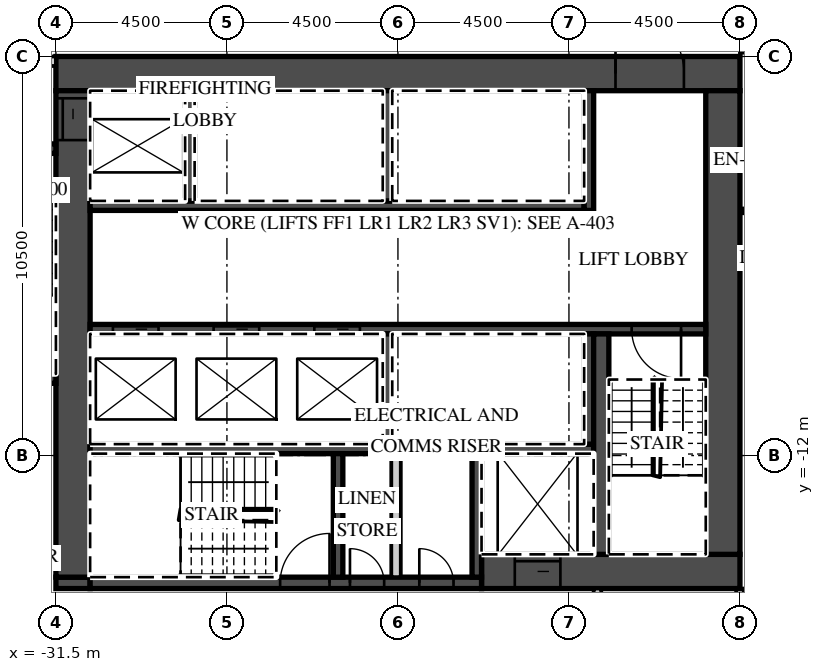
"""IFC4 building model, lengths in metres.
Left out: names, types, materials, properties, quantities, classifications, styles, units other than length and angle.
Written with IfcOpenShell. Run it as: python <this file> out.ifc"""

import sys

from ifc_helpers import new_model, si_unit, direction, frame, frame_2d, origin, place, context, subcontext, project, spatial, rectangle, extrude, element, fill, save


model = new_model("IFC4")
c1 = context("Model", 3, precision=1e-05, world=origin(), true_north=direction((0.0, 1.0)))
c2 = subcontext(c1, "Body", "Model", "MODEL_VIEW")
j1 = project(units=[si_unit("LENGTHUNIT", "METRE"), si_unit("PLANEANGLEUNIT", "RADIAN")], contexts=[c1])
p1 = place(None, origin())
s1 = spatial("IfcSite", under=j1, at=p1, CompositionType="ELEMENT")
p2 = place(p1, origin())
s2 = spatial("IfcBuilding", under=s1, at=p2, CompositionType="ELEMENT")
p3 = place(p2, frame((0.0, 0.0, 120.7)))
s3 = spatial("IfcBuildingStorey", under=s2, at=p3, CompositionType="ELEMENT", Elevation=120.7)
p4 = place(p3, frame((-13.5, -22.232, 0.0), z_axis=(0.0, 0.0, 1.0), x_axis=(0.0, 1.0, 0.0)))
e1 = element("IfcWall", 1, at=p4, inside=s3, PredefinedType="PARTITIONING", context=c2, shape_type="SweptSolid", body=[
    extrude(rectangle(XDim=6.732, YDim=0.2, at=frame_2d((3.366, 0.0))), origin(), (0.0, 0.0, 1.0), 3.02),
])
p5 = place(p3, frame((-13.5, -1.3, 0.0), z_axis=(0.0, 0.0, 1.0), x_axis=(1.0, 0.0, 0.0)))
e2 = element("IfcWall", 2, at=p5, inside=s3, PredefinedType="PARTITIONING", context=c2, shape_type="SweptSolid", body=[
    extrude(rectangle(XDim=60.932, YDim=0.2, at=frame_2d((30.466, 0.0))), origin(), (0.0, 0.0, 1.0), 3.02),
])
p6 = place(p5, frame((2.925, 0.0, 0.0)))
e3 = element("IfcOpeningElement", 3, at=p6, cuts=e2, PredefinedType="OPENING", context=c2, shape_type="SweptSolid", body=[
    extrude(rectangle(XDim=1.0, YDim=2.1, at=frame_2d((0.5, 1.05))), frame((0.0, 0.11, 0.0), z_axis=(0.0, -1.0, 0.0), x_axis=(1.0, 0.0, 0.0)), (0.0, 0.0, 1.0), 0.22),
])
p7 = place(p5, frame((9.863, 0.0, 0.0)))
e4 = element("IfcOpeningElement", 4, at=p7, cuts=e2, PredefinedType="OPENING", context=c2, shape_type="SweptSolid", body=[
    extrude(rectangle(XDim=1.2, YDim=2.1, at=frame_2d((0.6, 1.05))), frame((0.0, 0.11, 0.0), z_axis=(0.0, -1.0, 0.0), x_axis=(1.0, 0.0, 0.0)), (0.0, 0.0, 1.0), 0.22),
])
p8 = place(p5, frame((15.938, 0.0, 0.0)))
e5 = element("IfcOpeningElement", 5, at=p8, cuts=e2, PredefinedType="OPENING", context=c2, shape_type="SweptSolid", body=[
    extrude(rectangle(XDim=1.2, YDim=2.1, at=frame_2d((0.6, 1.05))), frame((0.0, 0.11, 0.0), z_axis=(0.0, -1.0, 0.0), x_axis=(1.0, 0.0, 0.0)), (0.0, 0.0, 1.0), 0.22),
])
p9 = place(p5, frame((27.862, 0.0, 0.0)))
e6 = element("IfcOpeningElement", 6, at=p9, cuts=e2, PredefinedType="OPENING", context=c2, shape_type="SweptSolid", body=[
    extrude(rectangle(XDim=1.2, YDim=2.1, at=frame_2d((0.6, 1.05))), frame((0.0, 0.11, 0.0), z_axis=(0.0, -1.0, 0.0), x_axis=(1.0, 0.0, 0.0)), (0.0, 0.0, 1.0), 0.22),
])
p10 = place(p5, frame((34.45, 0.0, 0.0)))
e7 = element("IfcOpeningElement", 7, at=p10, cuts=e2, PredefinedType="OPENING", context=c2, shape_type="SweptSolid", body=[
    extrude(rectangle(XDim=1.0, YDim=2.1, at=frame_2d((0.5, 1.05))), frame((0.0, 0.11, 0.0), z_axis=(0.0, -1.0, 0.0), x_axis=(1.0, 0.0, 0.0)), (0.0, 0.0, 1.0), 0.22),
])
p11 = place(p5, frame((36.55, 0.0, 0.0)))
e8 = element("IfcOpeningElement", 8, at=p11, cuts=e2, PredefinedType="OPENING", context=c2, shape_type="SweptSolid", body=[
    extrude(rectangle(XDim=1.0, YDim=2.1, at=frame_2d((0.5, 1.05))), frame((0.0, 0.11, 0.0), z_axis=(0.0, -1.0, 0.0), x_axis=(1.0, 0.0, 0.0)), (0.0, 0.0, 1.0), 0.22),
])
p12 = place(p5, frame((41.075, 0.0, 0.0)))
e9 = element("IfcOpeningElement", 9, at=p12, cuts=e2, PredefinedType="OPENING", context=c2, shape_type="SweptSolid", body=[
    extrude(rectangle(XDim=1.0, YDim=2.1, at=frame_2d((0.5, 1.05))), frame((0.0, 0.11, 0.0), z_axis=(0.0, -1.0, 0.0), x_axis=(1.0, 0.0, 0.0)), (0.0, 0.0, 1.0), 0.22),
])
p13 = place(p5, frame((45.55, 0.0, 0.0)))
e10 = element("IfcOpeningElement", 10, at=p13, cuts=e2, PredefinedType="OPENING", context=c2, shape_type="SweptSolid", body=[
    extrude(rectangle(XDim=1.0, YDim=2.1, at=frame_2d((0.5, 1.05))), frame((0.0, 0.11, 0.0), z_axis=(0.0, -1.0, 0.0), x_axis=(1.0, 0.0, 0.0)), (0.0, 0.0, 1.0), 0.22),
])
p14 = place(p5, frame((50.075, 0.0, 0.0)))
e11 = element("IfcOpeningElement", 11, at=p14, cuts=e2, PredefinedType="OPENING", context=c2, shape_type="SweptSolid", body=[
    extrude(rectangle(XDim=1.0, YDim=2.1, at=frame_2d((0.5, 1.05))), frame((0.0, 0.11, 0.0), z_axis=(0.0, -1.0, 0.0), x_axis=(1.0, 0.0, 0.0)), (0.0, 0.0, 1.0), 0.22),
])
p15 = place(p5, frame((54.575, 0.0, 0.0)))
e12 = element("IfcOpeningElement", 12, at=p15, cuts=e2, PredefinedType="OPENING", context=c2, shape_type="SweptSolid", body=[
    extrude(rectangle(XDim=1.0, YDim=2.1, at=frame_2d((0.5, 1.05))), frame((0.0, 0.11, 0.0), z_axis=(0.0, -1.0, 0.0), x_axis=(1.0, 0.0, 0.0)), (0.0, 0.0, 1.0), 0.22),
])
p16 = place(p5, frame((59.882, 0.0, 0.0)))
e13 = element("IfcOpeningElement", 13, at=p16, cuts=e2, PredefinedType="OPENING", context=c2, shape_type="SweptSolid", body=[
    extrude(rectangle(XDim=0.9, YDim=2.1, at=frame_2d((0.45, 1.05))), frame((0.0, 0.11, 0.0), z_axis=(0.0, -1.0, 0.0), x_axis=(1.0, 0.0, 0.0)), (0.0, 0.0, 1.0), 0.22),
])
p17 = place(p3, frame((-31.5, -1.95, 0.0), z_axis=(0.0, 0.0, 1.0), x_axis=(1.0, 0.0, 0.0)))
e14 = element("IfcWall", 14, at=p17, inside=s3, PredefinedType="SHEAR", context=c2, shape_type="SweptSolid", body=[
    extrude(rectangle(XDim=18.0, YDim=0.9, at=frame_2d((9.0, 0.0))), origin(), (0.0, 0.0, 1.0), 3.02),
])
p18 = place(p17, frame((14.725, 0.0, 0.0)))
e15 = element("IfcOpeningElement", 15, at=p18, cuts=e14, PredefinedType="OPENING", context=c2, shape_type="SweptSolid", body=[
    extrude(rectangle(XDim=1.8, YDim=2.1, at=frame_2d((0.9, 1.05))), frame((0.0, 0.46, 0.0), z_axis=(0.0, -1.0, 0.0), x_axis=(1.0, 0.0, 0.0)), (0.0, 0.0, 1.0), 0.92),
])
p19 = place(p3, frame((-20.3, -15.05, 0.0), z_axis=(0.0, 0.0, 1.0), x_axis=(1.0, 0.0, 0.0)))
e16 = element("IfcWall", 16, at=p19, inside=s3, PredefinedType="SHEAR", context=c2, shape_type="SweptSolid", body=[
    extrude(rectangle(XDim=6.8, YDim=0.9, at=frame_2d((3.4, 0.0))), origin(), (0.0, 0.0, 1.0), 3.02),
])
p20 = place(p19, frame((0.875, 0.0, 0.0)))
e17 = element("IfcOpeningElement", 17, at=p20, cuts=e16, PredefinedType="OPENING", context=c2, shape_type="SweptSolid", body=[
    extrude(rectangle(XDim=1.2, YDim=2.1, at=frame_2d((0.6, 1.05))), frame((0.0, 0.46, 0.0), z_axis=(0.0, -1.0, 0.0), x_axis=(1.0, 0.0, 0.0)), (0.0, 0.0, 1.0), 0.92),
])
p21 = place(p3, frame((-31.5, -15.35, 0.0), z_axis=(0.0, 0.0, 1.0), x_axis=(1.0, 0.0, 0.0)))
e18 = element("IfcWall", 18, at=p21, inside=s3, PredefinedType="SHEAR", context=c2, shape_type="SweptSolid", body=[
    extrude(rectangle(XDim=0.9, YDim=0.3, at=frame_2d((0.45, 0.0))), origin(), (0.0, 0.0, 1.0), 3.02),
])
p22 = place(p3, frame((-30.6, -15.35, 0.0), z_axis=(0.0, 0.0, 1.0), x_axis=(1.0, 0.0, 0.0)))
e19 = element("IfcWall", 19, at=p22, inside=s3, PredefinedType="SHEAR", context=c2, shape_type="SweptSolid", body=[
    extrude(rectangle(XDim=10.3, YDim=0.3, at=frame_2d((5.15, 0.0))), origin(), (0.0, 0.0, 1.0), 3.02),
])
p23 = place(p22, frame((5.0, 0.0, 0.0)))
e20 = element("IfcOpeningElement", 20, at=p23, cuts=e19, PredefinedType="OPENING", context=c2, shape_type="SweptSolid", body=[
    extrude(rectangle(XDim=1.3, YDim=2.1, at=frame_2d((0.65, 1.05))), frame((0.0, 0.16, 0.0), z_axis=(0.0, -1.0, 0.0), x_axis=(1.0, 0.0, 0.0)), (0.0, 0.0, 1.0), 0.32),
])
p24 = place(p22, frame((6.837, 0.0, 0.0)))
e21 = element("IfcOpeningElement", 21, at=p24, cuts=e19, PredefinedType="OPENING", context=c2, shape_type="SweptSolid", body=[
    extrude(rectangle(XDim=0.9, YDim=2.1, at=frame_2d((0.45, 1.05))), frame((0.0, 0.16, 0.0), z_axis=(0.0, -1.0, 0.0), x_axis=(1.0, 0.0, 0.0)), (0.0, 0.0, 1.0), 0.32),
])
p25 = place(p22, frame((8.663, 0.0, 0.0)))
e22 = element("IfcOpeningElement", 22, at=p25, cuts=e19, PredefinedType="OPENING", context=c2, shape_type="SweptSolid", body=[
    extrude(rectangle(XDim=0.9, YDim=2.1, at=frame_2d((0.45, 1.05))), frame((0.0, 0.16, 0.0), z_axis=(0.0, -1.0, 0.0), x_axis=(1.0, 0.0, 0.0)), (0.0, 0.0, 1.0), 0.32),
])
p26 = place(p3, frame((-31.05, -15.2, 0.0), z_axis=(0.0, 0.0, 1.0), x_axis=(0.0, 1.0, 0.0)))
e23 = element("IfcWall", 23, at=p26, inside=s3, PredefinedType="SHEAR", context=c2, shape_type="SweptSolid", body=[
    extrude(rectangle(XDim=12.8, YDim=0.9, at=frame_2d((6.4, 0.0))), origin(), (0.0, 0.0, 1.0), 3.02),
])
p27 = place(p26, frame((11.5, 0.0, 0.0)))
e24 = element("IfcOpeningElement", 24, at=p27, cuts=e23, PredefinedType="OPENING", context=c2, shape_type="SweptSolid", body=[
    extrude(rectangle(XDim=1.1, YDim=2.1, at=frame_2d((0.55, 1.05))), frame((0.0, 0.46, 0.0), z_axis=(0.0, -1.0, 0.0), x_axis=(1.0, 0.0, 0.0)), (0.0, 0.0, 1.0), 0.92),
])
p28 = place(p3, frame((-13.95, -14.6, 0.0), z_axis=(0.0, 0.0, 1.0), x_axis=(0.0, 1.0, 0.0)))
e25 = element("IfcWall", 25, at=p28, inside=s3, PredefinedType="SHEAR", context=c2, shape_type="SweptSolid", body=[
    extrude(rectangle(XDim=12.2, YDim=0.9, at=frame_2d((6.1, 0.0))), origin(), (0.0, 0.0, 1.0), 3.02),
])
p29 = place(p3, frame((-30.6, -5.425, 0.0), z_axis=(0.0, 0.0, 1.0), x_axis=(1.0, 0.0, 0.0)))
e26 = element("IfcWall", 26, at=p29, inside=s3, PredefinedType="SHEAR", context=c2, shape_type="SweptSolid", body=[
    extrude(rectangle(XDim=13.0, YDim=0.25, at=frame_2d((6.5, 0.0))), origin(), (0.0, 0.0, 1.0), 3.02),
])
p30 = place(p3, frame((-17.475, -5.55, 0.0), z_axis=(0.0, 0.0, 1.0), x_axis=(0.0, 1.0, 0.0)))
e27 = element("IfcWall", 27, at=p30, inside=s3, PredefinedType="SHEAR", context=c2, shape_type="SweptSolid", body=[
    extrude(rectangle(XDim=3.15, YDim=0.25, at=frame_2d((1.575, 0.0))), origin(), (0.0, 0.0, 1.0), 3.02),
])
for number, where, z_axis, x_axis in (
    (28, (-27.975, -5.3, 0.0), (0.0, 0.0, 1.0), (0.0, 1.0, 0.0)),
    (29, (-22.775, -5.3, 0.0), (0.0, 0.0, 1.0), (0.0, 1.0, 0.0)),
):
    element("IfcWall", number, at=place(p3, frame(where, z_axis=z_axis, x_axis=x_axis)), inside=s3, PredefinedType="SHEAR", context=c2, shape_type="SweptSolid", body=[
        extrude(rectangle(XDim=2.9, YDim=0.25, at=frame_2d((1.45, 0.0))), origin(), (0.0, 0.0, 1.0), 3.02),
    ])
p31 = place(p3, frame((-30.6, -8.675, 0.0), z_axis=(0.0, 0.0, 1.0), x_axis=(1.0, 0.0, 0.0)))
e30 = element("IfcWall", 30, at=p31, inside=s3, PredefinedType="SHEAR", context=c2, shape_type="SweptSolid", body=[
    extrude(rectangle(XDim=16.2, YDim=0.25, at=frame_2d((8.1, 0.0))), origin(), (0.0, 0.0, 1.0), 3.02),
])
p32 = place(p31, frame((0.6, 0.0, 0.0)))
e31 = element("IfcOpeningElement", 31, at=p32, cuts=e30, PredefinedType="OPENING", context=c2, shape_type="SweptSolid", body=[
    extrude(rectangle(XDim=1.2, YDim=2.1, at=frame_2d((0.6, 1.05))), frame((0.0, 0.135, 0.0), z_axis=(0.0, -1.0, 0.0), x_axis=(1.0, 0.0, 0.0)), (0.0, 0.0, 1.0), 0.27),
])
p33 = place(p31, frame((3.25, 0.0, 0.0)))
e32 = element("IfcOpeningElement", 32, at=p33, cuts=e30, PredefinedType="OPENING", context=c2, shape_type="SweptSolid", body=[
    extrude(rectangle(XDim=1.2, YDim=2.1, at=frame_2d((0.6, 1.05))), frame((0.0, 0.135, 0.0), z_axis=(0.0, -1.0, 0.0), x_axis=(1.0, 0.0, 0.0)), (0.0, 0.0, 1.0), 0.27),
])
p34 = place(p31, frame((5.9, 0.0, 0.0)))
e33 = element("IfcOpeningElement", 33, at=p34, cuts=e30, PredefinedType="OPENING", context=c2, shape_type="SweptSolid", body=[
    extrude(rectangle(XDim=1.2, YDim=2.1, at=frame_2d((0.6, 1.05))), frame((0.0, 0.135, 0.0), z_axis=(0.0, -1.0, 0.0), x_axis=(1.0, 0.0, 0.0)), (0.0, 0.0, 1.0), 0.27),
])
p35 = place(p31, frame((14.25, 0.0, 0.0)))
e34 = element("IfcOpeningElement", 34, at=p35, cuts=e30, PredefinedType="OPENING", context=c2, shape_type="SweptSolid", body=[
    extrude(rectangle(XDim=1.3, YDim=2.1, at=frame_2d((0.65, 1.05))), frame((0.0, 0.135, 0.0), z_axis=(0.0, -1.0, 0.0), x_axis=(1.0, 0.0, 0.0)), (0.0, 0.0, 1.0), 0.27),
])
p36 = place(p3, frame((-30.6, -11.825, 0.0), z_axis=(0.0, 0.0, 1.0), x_axis=(1.0, 0.0, 0.0)))
e35 = element("IfcWall", 35, at=p36, inside=s3, PredefinedType="SHEAR", context=c2, shape_type="SweptSolid", body=[
    extrude(rectangle(XDim=13.25, YDim=0.25, at=frame_2d((6.625, 0.0))), origin(), (0.0, 0.0, 1.0), 3.02),
])
for number, where, z_axis, x_axis in (
    (36, (-17.475, -11.7, 0.0), (0.0, 0.0, 1.0), (0.0, 1.0, 0.0)),
    (37, (-22.775, -11.7, 0.0), (0.0, 0.0, 1.0), (0.0, 1.0, 0.0)),
):
    element("IfcWall", number, at=place(p3, frame(where, z_axis=z_axis, x_axis=x_axis)), inside=s3, PredefinedType="SHEAR", context=c2, shape_type="SweptSolid", body=[
        extrude(rectangle(XDim=2.9, YDim=0.25, at=frame_2d((1.45, 0.0))), origin(), (0.0, 0.0, 1.0), 3.02),
    ])
p37 = place(p3, frame((-17.15, -14.6, 0.0), z_axis=(0.0, 0.0, 1.0), x_axis=(0.0, 1.0, 0.0)))
e38 = element("IfcWall", 38, at=p37, inside=s3, PredefinedType="SHEAR", context=c2, shape_type="SweptSolid", body=[
    extrude(rectangle(XDim=5.8, YDim=0.4, at=frame_2d((2.9, 0.0))), origin(), (0.0, 0.0, 1.0), 3.02),
])
for number, where, z_axis, x_axis in (
    (39, (-20.425, -15.2, 0.0), (0.0, 0.0, 1.0), (0.0, 1.0, 0.0)),
    (40, (-24.075, -15.2, 0.0), (0.0, 0.0, 1.0), (0.0, 1.0, 0.0)),
):
    element("IfcWall", number, at=place(p3, frame(where, z_axis=z_axis, x_axis=x_axis)), inside=s3, PredefinedType="SHEAR", context=c2, shape_type="SweptSolid", body=[
        extrude(rectangle(XDim=3.25, YDim=0.25, at=frame_2d((1.625, 0.0))), origin(), (0.0, 0.0, 1.0), 3.02),
    ])
p38 = place(p3, frame((-22.55, -15.2, 0.0), z_axis=(0.0, 0.0, 1.0), x_axis=(0.0, 1.0, 0.0)))
e41 = element("IfcWall", 41, at=p38, inside=s3, PredefinedType="PARTITIONING", context=c2, shape_type="SweptSolid", body=[
    extrude(rectangle(XDim=3.25, YDim=0.25, at=frame_2d((1.625, 0.0))), origin(), (0.0, 0.0, 1.0), 3.02),
])
p39 = place(p3, frame((-39.035, -1.625, 0.0), z_axis=(0.0, 0.0, 1.0), x_axis=(1.0, 0.0, 0.0)))
e42 = element("IfcWall", 42, at=p39, inside=s3, PredefinedType="PARTITIONING", context=c2, shape_type="SweptSolid", body=[
    extrude(rectangle(XDim=7.535, YDim=0.25, at=frame_2d((3.768, 0.0))), origin(), (0.0, 0.0, 1.0), 3.02),
])
p40 = place(p39, frame((5.61, 0.0, 0.0)))
e43 = element("IfcOpeningElement", 43, at=p40, cuts=e42, PredefinedType="OPENING", context=c2, shape_type="SweptSolid", body=[
    extrude(rectangle(XDim=1.3, YDim=2.1, at=frame_2d((0.65, 1.05))), frame((0.0, 0.135, 0.0), z_axis=(0.0, -1.0, 0.0), x_axis=(1.0, 0.0, 0.0)), (0.0, 0.0, 1.0), 0.27),
])
p41 = place(p39, frame((3.185, 0.0, 0.0)))
e44 = element("IfcOpeningElement", 44, at=p41, cuts=e42, PredefinedType="OPENING", context=c2, shape_type="SweptSolid", body=[
    extrude(rectangle(XDim=1.1, YDim=2.1, at=frame_2d((0.55, 1.05))), frame((0.0, 0.135, 0.0), z_axis=(0.0, -1.0, 0.0), x_axis=(1.0, 0.0, 0.0)), (0.0, 0.0, 1.0), 0.27),
])
p42 = place(p3, frame((-34.05, -3.925, 0.0), z_axis=(0.0, 0.0, 1.0), x_axis=(1.0, 0.0, 0.0)))
e45 = element("IfcWall", 45, at=p42, inside=s3, PredefinedType="SHEAR", context=c2, shape_type="SweptSolid", body=[
    extrude(rectangle(XDim=2.55, YDim=0.25, at=frame_2d((1.275, 0.0))), origin(), (0.0, 0.0, 1.0), 3.02),
])
p43 = place(p42, frame((0.625, 0.0, 0.0)))
e46 = element("IfcOpeningElement", 46, at=p43, cuts=e45, PredefinedType="OPENING", context=c2, shape_type="SweptSolid", body=[
    extrude(rectangle(XDim=1.3, YDim=2.1, at=frame_2d((0.65, 1.05))), frame((0.0, 0.135, 0.0), z_axis=(0.0, -1.0, 0.0), x_axis=(1.0, 0.0, 0.0)), (0.0, 0.0, 1.0), 0.27),
])
p44 = place(p3, frame((-34.05, -9.975, 0.0), z_axis=(0.0, 0.0, 1.0), x_axis=(1.0, 0.0, 0.0)))
e47 = element("IfcWall", 47, at=p44, inside=s3, PredefinedType="SHEAR", context=c2, shape_type="SweptSolid", body=[
    extrude(rectangle(XDim=2.55, YDim=0.25, at=frame_2d((1.275, 0.0))), origin(), (0.0, 0.0, 1.0), 3.02),
])
p45 = place(p3, frame((-17.25, -17.7, 0.0), z_axis=(0.0, 0.0, 1.0), x_axis=(0.0, 1.0, 0.0)))
e48 = element("IfcWall", 48, at=p45, inside=s3, PredefinedType="PARTITIONING", context=c2, shape_type="SweptSolid", body=[
    extrude(rectangle(XDim=2.2, YDim=0.2, at=frame_2d((1.1, 0.0))), origin(), (0.0, 0.0, 1.0), 3.02),
])
p46 = place(p32, origin())
e49 = element("IfcDoor", 49, at=p46, inside=s3, OperationType="SLIDING_TO_LEFT", PredefinedType="DOOR", context=c2, shape_type="SweptSolid", body=[
    extrude(rectangle(XDim=1.2, YDim=2.1, at=frame_2d((0.6, 1.05))), frame((0.0, 0.025, 0.0), z_axis=(0.0, -1.0, 0.0), x_axis=(1.0, 0.0, 0.0)), (0.0, 0.0, 1.0), 0.05),
])
fill(e31, e49)
p47 = place(p33, origin())
e50 = element("IfcDoor", 50, at=p47, inside=s3, OperationType="SLIDING_TO_RIGHT", PredefinedType="DOOR", context=c2, shape_type="SweptSolid", body=[
    extrude(rectangle(XDim=1.2, YDim=2.1, at=frame_2d((0.6, 1.05))), frame((0.0, 0.025, 0.0), z_axis=(0.0, -1.0, 0.0), x_axis=(1.0, 0.0, 0.0)), (0.0, 0.0, 1.0), 0.05),
])
fill(e32, e50)
p48 = place(p34, origin())
e51 = element("IfcDoor", 51, at=p48, inside=s3, OperationType="SLIDING_TO_RIGHT", PredefinedType="DOOR", context=c2, shape_type="SweptSolid", body=[
    extrude(rectangle(XDim=1.2, YDim=2.1, at=frame_2d((0.6, 1.05))), frame((0.0, 0.025, 0.0), z_axis=(0.0, -1.0, 0.0), x_axis=(1.0, 0.0, 0.0)), (0.0, 0.0, 1.0), 0.05),
])
fill(e33, e51)
p49 = place(p20, origin())
e52 = element("IfcDoor", 52, at=p49, inside=s3, OperationType="SLIDING_TO_LEFT", PredefinedType="DOOR", context=c2, shape_type="SweptSolid", body=[
    extrude(rectangle(XDim=1.2, YDim=2.1, at=frame_2d((0.6, 1.05))), frame((0.0, 0.025, 0.0), z_axis=(0.0, -1.0, 0.0), x_axis=(1.0, 0.0, 0.0)), (0.0, 0.0, 1.0), 0.05),
])
fill(e17, e52)
p50 = place(p27, origin())
e53 = element("IfcDoor", 53, at=p50, inside=s3, OperationType="SLIDING_TO_RIGHT", PredefinedType="DOOR", context=c2, shape_type="SweptSolid", body=[
    extrude(rectangle(XDim=1.1, YDim=2.1, at=frame_2d((0.55, 1.05))), frame((0.0, 0.025, 0.0), z_axis=(0.0, -1.0, 0.0), x_axis=(1.0, 0.0, 0.0)), (0.0, 0.0, 1.0), 0.05),
])
fill(e24, e53)
p51 = place(p18, origin())
e54 = element("IfcDoor", 54, at=p51, inside=s3, OperationType="DOUBLE_DOOR_DOUBLE_SWING", PredefinedType="DOOR", context=c2, shape_type="SweptSolid", body=[
    extrude(rectangle(XDim=1.8, YDim=2.1, at=frame_2d((0.9, 1.05))), frame((0.0, 0.025, 0.0), z_axis=(0.0, -1.0, 0.0), x_axis=(1.0, 0.0, 0.0)), (0.0, 0.0, 1.0), 0.05),
])
fill(e15, e54)
p52 = place(p35, origin())
e55 = element("IfcDoor", 55, at=p52, inside=s3, OperationType="SINGLE_SWING_RIGHT", PredefinedType="DOOR", context=c2, shape_type="SweptSolid", body=[
    extrude(rectangle(XDim=1.3, YDim=2.1, at=frame_2d((0.65, 1.05))), frame((0.0, 0.025, 0.0), z_axis=(0.0, -1.0, 0.0), x_axis=(1.0, 0.0, 0.0)), (0.0, 0.0, 1.0), 0.05),
])
fill(e34, e55)
p53 = place(p23, origin())
e56 = element("IfcDoor", 56, at=p53, inside=s3, OperationType="SINGLE_SWING_RIGHT", PredefinedType="DOOR", context=c2, shape_type="SweptSolid", body=[
    extrude(rectangle(XDim=1.3, YDim=2.1, at=frame_2d((0.65, 1.05))), frame((0.0, 0.025, 0.0), z_axis=(0.0, -1.0, 0.0), x_axis=(1.0, 0.0, 0.0)), (0.0, 0.0, 1.0), 0.05),
])
fill(e20, e56)
p54 = place(p24, origin())
e57 = element("IfcDoor", 57, at=p54, inside=s3, OperationType="SINGLE_SWING_LEFT", PredefinedType="DOOR", context=c2, shape_type="SweptSolid", body=[
    extrude(rectangle(XDim=0.9, YDim=2.1, at=frame_2d((0.45, 1.05))), frame((0.0, 0.025, 0.0), z_axis=(0.0, -1.0, 0.0), x_axis=(1.0, 0.0, 0.0)), (0.0, 0.0, 1.0), 0.05),
])
fill(e21, e57)
p55 = place(p25, origin())
e58 = element("IfcDoor", 58, at=p55, inside=s3, OperationType="SINGLE_SWING_LEFT", PredefinedType="DOOR", context=c2, shape_type="SweptSolid", body=[
    extrude(rectangle(XDim=0.9, YDim=2.1, at=frame_2d((0.45, 1.05))), frame((0.0, 0.025, 0.0), z_axis=(0.0, -1.0, 0.0), x_axis=(1.0, 0.0, 0.0)), (0.0, 0.0, 1.0), 0.05),
])
fill(e22, e58)
save(model, sys.argv[1])
